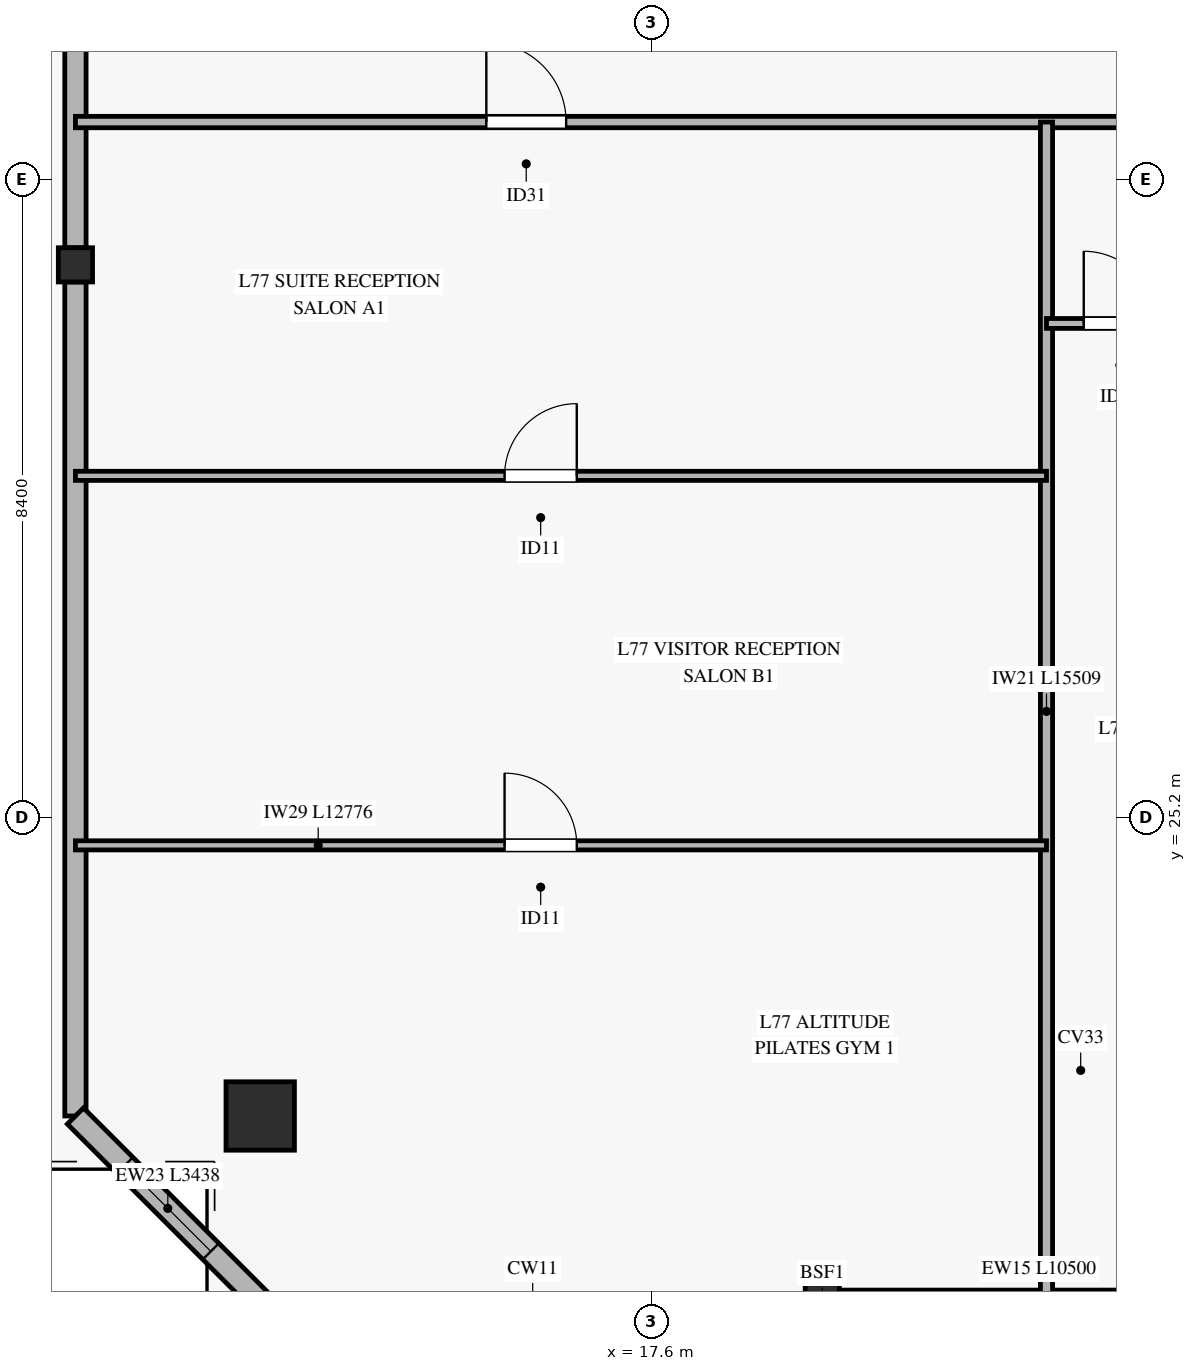
"""IFC4 building model, lengths in metres.
Left out: names, types, materials, properties, quantities, classifications, styles, units other than length and angle.
Written with IfcOpenShell. Run it as: python <this file> out.ifc"""

import sys

from ifc_helpers import new_model, si_unit, direction, frame, frame_2d, origin, origin_2d, place, context, subcontext, project, spatial, rectangle, hollow_rectangle, extrude, source, transform, mapped, element, fill, save


model = new_model("IFC4")
c1 = context("Model", 3, precision=1e-05, world=origin(), true_north=direction((0.0, 1.0)))
c2 = subcontext(c1, "Body", "Model", "MODEL_VIEW")
j1 = project(units=[si_unit("LENGTHUNIT", "METRE"), si_unit("PLANEANGLEUNIT", "RADIAN")], contexts=[c1])
p1 = place(None, origin())
s1 = spatial("IfcSite", under=j1, at=p1, CompositionType="ELEMENT")
p2 = place(p1, origin())
s2 = spatial("IfcBuilding", under=s1, at=p2, CompositionType="ELEMENT")
p3 = place(p2, frame((0.0, 0.0, 300.6)))
s3 = spatial("IfcBuildingStorey", under=s2, at=p3, CompositionType="ELEMENT", Elevation=300.6)
m1 = source(origin(), c2, "Body", "SweptSolid", [
    extrude(hollow_rectangle(XDim=0.9, YDim=0.9, WallThickness=0.04, at=origin_2d()), origin(), (0.0, 0.0, 1.0), 3.326),
])
p4 = place(p3, frame((12.455, 21.272, 0.0), z_axis=(0.111202469938, 0.266078517177, 0.957515656988), x_axis=(-0.922662215897, 0.385609174368, 0.0)))
e1 = element("IfcColumn", 1, at=p4, inside=s3, PredefinedType="COLUMN", context=c2, shape_type="MappedRepresentation", body=[
    mapped(m1, transform((0.0, 0.0, 0.0), x_axis=(1.0, 0.0, 0.0), y_axis=(0.0, 1.0, 0.0), z_axis=(0.0, 0.0, 1.0), scale=1.0)),
])
m2 = source(origin(), c2, "Body", "SweptSolid", [
    extrude(hollow_rectangle(XDim=0.45, YDim=0.45, WallThickness=0.022, at=origin_2d()), origin(), (0.0, 0.0, 1.0), 3.318),
])
p5 = place(p3, frame((19.85, 18.841, 0.0), z_axis=(0.0, 0.28055656303, 0.959837494027), x_axis=(-1.0, 0.0, 0.0)))
e2 = element("IfcColumn", 2, at=p5, inside=s3, PredefinedType="COLUMN", context=c2, shape_type="MappedRepresentation", body=[
    mapped(m2, transform((0.0, 0.0, 0.0), x_axis=(1.0, 0.0, 0.0), y_axis=(0.0, 1.0, 0.0), z_axis=(0.0, 0.0, 1.0), scale=1.0)),
])
m3 = source(origin(), c2, "Body", "SweptSolid", [
    extrude(hollow_rectangle(XDim=0.45, YDim=0.45, WallThickness=0.022, at=origin_2d()), origin(), (0.0, 0.0, 1.0), 3.245),
])
p6 = place(p3, frame((10.024, 32.471, 0.0), z_axis=(0.128187471658, 0.143308176941, 0.981341295642), x_axis=(-0.745333400914, 0.666691923967, 0.0)))
e3 = element("IfcColumn", 3, at=p6, inside=s3, PredefinedType="COLUMN", context=c2, shape_type="MappedRepresentation", body=[
    mapped(m3, transform((0.0, 0.0, 0.0), x_axis=(1.0, 0.0, 0.0), y_axis=(0.0, 1.0, 0.0), z_axis=(0.0, 0.0, 1.0), scale=1.0)),
])
p7 = place(p3, frame((20.075, 18.841, 0.0), z_axis=(0.0, 0.0, 1.0), x_axis=(1.0, 0.0, 0.0)))
e4 = element("IfcWall", 4, at=p7, inside=s3, PredefinedType="SOLIDWALL", context=c2, shape_type="SweptSolid", body=[
    extrude(rectangle(XDim=10.5, YDim=0.28, at=frame_2d((5.25, 0.0))), origin(), (0.0, 0.0, 1.0), 2.815),
])
p8 = place(p7, frame((4.325, 0.0, 0.0)))
e5 = element("IfcOpeningElement", 5, at=p8, cuts=e4, PredefinedType="OPENING", context=c2, shape_type="SweptSolid", body=[
    extrude(rectangle(XDim=1.8, YDim=2.25, at=frame_2d((0.9, 1.125))), frame((0.0, 0.15, 0.0), z_axis=(0.0, -1.0, 0.0), x_axis=(1.0, 0.0, 0.0)), (0.0, 0.0, 1.0), 0.3),
])
p9 = place(p7, frame((0.517, 0.0, 0.45)))
e6 = element("IfcOpeningElement", 6, at=p9, cuts=e4, PredefinedType="OPENING", context=c2, shape_type="SweptSolid", body=[
    extrude(rectangle(XDim=1.6, YDim=2.0, at=frame_2d((0.8, 1.0))), frame((0.0, 0.15, 0.0), z_axis=(0.0, -1.0, 0.0), x_axis=(1.0, 0.0, 0.0)), (0.0, 0.0, 1.0), 0.3),
])
p10 = place(p7, frame((7.305, 0.0, 0.45)))
e7 = element("IfcOpeningElement", 7, at=p10, cuts=e4, PredefinedType="OPENING", context=c2, shape_type="SweptSolid", body=[
    extrude(rectangle(XDim=1.6, YDim=2.0, at=frame_2d((0.8, 1.0))), frame((0.0, 0.15, 0.0), z_axis=(0.0, -1.0, 0.0), x_axis=(1.0, 0.0, 0.0)), (0.0, 0.0, 1.0), 0.3),
])
p11 = place(p3, frame((10.024, 21.272, 0.0), z_axis=(0.0, 0.0, 1.0), x_axis=(0.0, 1.0, 0.0)))
e8 = element("IfcWall", 8, at=p11, inside=s3, PredefinedType="SOLIDWALL", context=c2, shape_type="SweptSolid", body=[
    extrude(rectangle(XDim=10.974, YDim=0.28, at=frame_2d((5.487, 0.0))), origin(), (0.0, 0.0, 1.0), 2.815),
])
p12 = place(p3, frame((10.024, 32.696, 0.0), z_axis=(0.0, 0.0, 1.0), x_axis=(0.0, 1.0, 0.0)))
e9 = element("IfcWall", 9, at=p12, inside=s3, PredefinedType="SOLIDWALL", context=c2, shape_type="SweptSolid", body=[
    extrude(rectangle(XDim=10.973, YDim=0.28, at=frame_2d((5.486, 0.0))), origin(), (0.0, 0.0, 1.0), 2.815),
])
p13 = place(p12, frame((5.159, 0.0, 0.45)))
e10 = element("IfcOpeningElement", 10, at=p13, cuts=e9, PredefinedType="OPENING", context=c2, shape_type="SweptSolid", body=[
    extrude(rectangle(XDim=2.2, YDim=2.1, at=frame_2d((1.1, 1.05))), frame((0.0, 0.15, 0.0), z_axis=(0.0, -1.0, 0.0), x_axis=(1.0, 0.0, 0.0)), (0.0, 0.0, 1.0), 0.3),
])
p14 = place(p3, frame((10.024, 21.272, 0.0), z_axis=(0.0, 0.0, 1.0), x_axis=(0.707142286536, -0.707071274055, 0.0)))
e11 = element("IfcWall", 11, at=p14, inside=s3, PredefinedType="SOLIDWALL", context=c2, shape_type="SweptSolid", body=[
    extrude(rectangle(XDim=3.438, YDim=0.3, at=frame_2d((1.719, 0.0))), origin(), (0.0, 0.0, 1.0), 2.815),
])
p15 = place(p14, frame((0.919, 0.0, 0.45)))
e12 = element("IfcOpeningElement", 12, at=p15, cuts=e11, PredefinedType="OPENING", context=c2, shape_type="SweptSolid", body=[
    extrude(rectangle(XDim=1.6, YDim=2.0, at=frame_2d((0.8, 1.0))), frame((0.0, 0.16, 0.0), z_axis=(0.0, -1.0, 0.0), x_axis=(1.0, 0.0, 0.0)), (0.0, 0.0, 1.0), 0.32),
])
p16 = place(p3, frame((10.024, 34.35, 0.0), z_axis=(0.0, 0.0, 1.0), x_axis=(1.0, 0.0, 0.0)))
e13 = element("IfcWall", 13, at=p16, inside=s3, PredefinedType="PARTITIONING", context=c2, shape_type="SweptSolid", body=[
    extrude(rectangle(XDim=50.352, YDim=0.15, at=frame_2d((25.176, 0.0))), origin(), (0.0, 0.0, 1.0), 2.47),
])
p17 = place(p16, frame((5.406, 0.0, 0.0)))
e14 = element("IfcOpeningElement", 14, at=p17, cuts=e13, PredefinedType="OPENING", context=c2, shape_type="SweptSolid", body=[
    extrude(rectangle(XDim=1.05, YDim=2.15, at=frame_2d((0.525, 1.075))), frame((0.0, 0.085, 0.0), z_axis=(0.0, -1.0, 0.0), x_axis=(1.0, 0.0, 0.0)), (0.0, 0.0, 1.0), 0.17),
])
p18 = place(p16, frame((15.651, 0.0, 0.0)))
e15 = element("IfcOpeningElement", 15, at=p18, cuts=e13, PredefinedType="OPENING", context=c2, shape_type="SweptSolid", body=[
    extrude(rectangle(XDim=1.05, YDim=2.15, at=frame_2d((0.525, 1.075))), frame((0.0, 0.085, 0.0), z_axis=(0.0, -1.0, 0.0), x_axis=(1.0, 0.0, 0.0)), (0.0, 0.0, 1.0), 0.17),
])
p19 = place(p16, frame((22.129, 0.0, 0.0)))
e16 = element("IfcOpeningElement", 16, at=p19, cuts=e13, PredefinedType="OPENING", context=c2, shape_type="SweptSolid", body=[
    extrude(rectangle(XDim=1.05, YDim=2.15, at=frame_2d((0.525, 1.075))), frame((0.0, 0.085, 0.0), z_axis=(0.0, -1.0, 0.0), x_axis=(1.0, 0.0, 0.0)), (0.0, 0.0, 1.0), 0.17),
])
p20 = place(p16, frame((29.151, 0.0, 0.0)))
e17 = element("IfcOpeningElement", 17, at=p20, cuts=e13, PredefinedType="OPENING", context=c2, shape_type="SweptSolid", body=[
    extrude(rectangle(XDim=1.05, YDim=2.15, at=frame_2d((0.525, 1.075))), frame((0.0, 0.085, 0.0), z_axis=(0.0, -1.0, 0.0), x_axis=(1.0, 0.0, 0.0)), (0.0, 0.0, 1.0), 0.17),
])
p21 = place(p16, frame((35.701, 0.0, 0.0)))
e18 = element("IfcOpeningElement", 18, at=p21, cuts=e13, PredefinedType="OPENING", context=c2, shape_type="SweptSolid", body=[
    extrude(rectangle(XDim=1.05, YDim=2.15, at=frame_2d((0.525, 1.075))), frame((0.0, 0.085, 0.0), z_axis=(0.0, -1.0, 0.0), x_axis=(1.0, 0.0, 0.0)), (0.0, 0.0, 1.0), 0.17),
])
p22 = place(p16, frame((43.42, 0.0, 0.0)))
e19 = element("IfcOpeningElement", 19, at=p22, cuts=e13, PredefinedType="OPENING", context=c2, shape_type="SweptSolid", body=[
    extrude(rectangle(XDim=1.05, YDim=2.15, at=frame_2d((0.525, 1.075))), frame((0.0, 0.085, 0.0), z_axis=(0.0, -1.0, 0.0), x_axis=(1.0, 0.0, 0.0)), (0.0, 0.0, 1.0), 0.17),
])
p23 = place(p3, frame((22.8, 18.841, 0.0), z_axis=(0.0, 0.0, 1.0), x_axis=(0.0, 1.0, 0.0)))
e20 = element("IfcWall", 20, at=p23, inside=s3, PredefinedType="PARTITIONING", context=c2, shape_type="SweptSolid", body=[
    extrude(rectangle(XDim=15.509, YDim=0.16, at=frame_2d((7.754, 0.0))), origin(), (0.0, 0.0, 1.0), 2.77),
])
p24 = place(p3, frame((10.024, 24.833, 0.0), z_axis=(0.0, 0.0, 1.0), x_axis=(1.0, 0.0, 0.0)))
e21 = element("IfcWall", 21, at=p24, inside=s3, PredefinedType="PARTITIONING", context=c2, shape_type="SweptSolid", body=[
    extrude(rectangle(XDim=12.776, YDim=0.12, at=frame_2d((6.388, 0.0))), origin(), (0.0, 0.0, 1.0), 2.47),
])
p25 = place(p24, frame((5.646, 0.0, 0.0)))
e22 = element("IfcOpeningElement", 22, at=p25, cuts=e21, PredefinedType="OPENING", context=c2, shape_type="SweptSolid", body=[
    extrude(rectangle(XDim=0.95, YDim=2.1, at=frame_2d((0.475, 1.05))), frame((0.0, 0.07, 0.0), z_axis=(0.0, -1.0, 0.0), x_axis=(1.0, 0.0, 0.0)), (0.0, 0.0, 1.0), 0.14),
])
p26 = place(p3, frame((10.024, 29.695, 0.0), z_axis=(0.0, 0.0, 1.0), x_axis=(1.0, 0.0, 0.0)))
e23 = element("IfcWall", 23, at=p26, inside=s3, PredefinedType="PARTITIONING", context=c2, shape_type="SweptSolid", body=[
    extrude(rectangle(XDim=12.776, YDim=0.12, at=frame_2d((6.388, 0.0))), origin(), (0.0, 0.0, 1.0), 2.47),
])
p27 = place(p26, frame((5.646, 0.0, 0.0)))
e24 = element("IfcOpeningElement", 24, at=p27, cuts=e23, PredefinedType="OPENING", context=c2, shape_type="SweptSolid", body=[
    extrude(rectangle(XDim=0.95, YDim=2.1, at=frame_2d((0.475, 1.05))), frame((0.0, 0.07, 0.0), z_axis=(0.0, -1.0, 0.0), x_axis=(1.0, 0.0, 0.0)), (0.0, 0.0, 1.0), 0.14),
])
p28 = place(p3, frame((22.8, 31.7, 0.0), z_axis=(0.0, 0.0, 1.0), x_axis=(1.0, 0.0, 0.0)))
e25 = element("IfcWall", 25, at=p28, inside=s3, PredefinedType="PARTITIONING", context=c2, shape_type="SweptSolid", body=[
    extrude(rectangle(XDim=1.69, YDim=0.13, at=frame_2d((0.845, 0.0))), origin(), (0.0, 0.0, 1.0), 3.185),
])
p29 = place(p28, frame((0.49, 0.0, 0.0)))
e26 = element("IfcOpeningElement", 26, at=p29, cuts=e25, PredefinedType="OPENING", context=c2, shape_type="SweptSolid", body=[
    extrude(rectangle(XDim=0.95, YDim=2.1, at=frame_2d((0.475, 1.05))), frame((0.0, 0.075, 0.0), z_axis=(0.0, -1.0, 0.0), x_axis=(1.0, 0.0, 0.0)), (0.0, 0.0, 1.0), 0.15),
])
m4 = source(origin(), c2, "Body", "SweptSolid", [
    extrude(rectangle(XDim=1.6, YDim=2.0, at=frame_2d((0.8, 1.0))), frame((0.0, 0.03, 0.0), z_axis=(0.0, -1.0, 0.0), x_axis=(1.0, 0.0, 0.0)), (0.0, 0.0, 1.0), 0.06),
])
p30 = place(p15, origin())
e27 = element("IfcWindow", 27, at=p30, inside=s3, PartitioningType="SINGLE_PANEL", PredefinedType="WINDOW", context=c2, shape_type="MappedRepresentation", body=[
    mapped(m4, transform((0.0, 0.0, 0.0), x_axis=(1.0, 0.0, 0.0), y_axis=(0.0, 1.0, 0.0), z_axis=(0.0, 0.0, 1.0), scale=1.0)),
])
fill(e12, e27)
m5 = source(origin(), c2, "Body", "SweptSolid", [
    extrude(rectangle(XDim=1.05, YDim=2.15, at=frame_2d((0.525, 1.075))), frame((0.0, 0.025, 0.0), z_axis=(0.0, -1.0, 0.0), x_axis=(1.0, 0.0, 0.0)), (0.0, 0.0, 1.0), 0.05),
])
p31 = place(p17, origin())
e28 = element("IfcDoor", 28, at=p31, inside=s3, OperationType="SINGLE_SWING_LEFT", PredefinedType="DOOR", context=c2, shape_type="MappedRepresentation", body=[
    mapped(m5, transform((0.0, 0.0, 0.0), x_axis=(1.0, 0.0, 0.0), y_axis=(0.0, 1.0, 0.0), z_axis=(0.0, 0.0, 1.0), scale=1.0)),
])
fill(e14, e28)
m6 = source(origin(), c2, "Body", "SweptSolid", [
    extrude(rectangle(XDim=0.95, YDim=2.1, at=frame_2d((0.475, 1.05))), frame((0.0, 0.025, 0.0), z_axis=(0.0, -1.0, 0.0), x_axis=(1.0, 0.0, 0.0)), (0.0, 0.0, 1.0), 0.05),
])
p32 = place(p27, origin())
e29 = element("IfcDoor", 29, at=p32, inside=s3, OperationType="SINGLE_SWING_RIGHT", PredefinedType="DOOR", context=c2, shape_type="MappedRepresentation", body=[
    mapped(m6, transform((0.0, 0.0, 0.0), x_axis=(1.0, 0.0, 0.0), y_axis=(0.0, 1.0, 0.0), z_axis=(0.0, 0.0, 1.0), scale=1.0)),
])
fill(e24, e29)
p33 = place(p25, origin())
e30 = element("IfcDoor", 30, at=p33, inside=s3, OperationType="SINGLE_SWING_LEFT", PredefinedType="DOOR", context=c2, shape_type="MappedRepresentation", body=[
    mapped(m6, transform((0.0, 0.0, 0.0), x_axis=(1.0, 0.0, 0.0), y_axis=(0.0, 1.0, 0.0), z_axis=(0.0, 0.0, 1.0), scale=1.0)),
])
fill(e22, e30)
p34 = place(p29, origin())
e31 = element("IfcDoor", 31, at=p34, inside=s3, OperationType="SINGLE_SWING_LEFT", PredefinedType="DOOR", context=c2, shape_type="MappedRepresentation", body=[
    mapped(m6, transform((0.0, 0.0, 0.0), x_axis=(1.0, 0.0, 0.0), y_axis=(0.0, 1.0, 0.0), z_axis=(0.0, 0.0, 1.0), scale=1.0)),
])
fill(e26, e31)
save(model, sys.argv[1])
